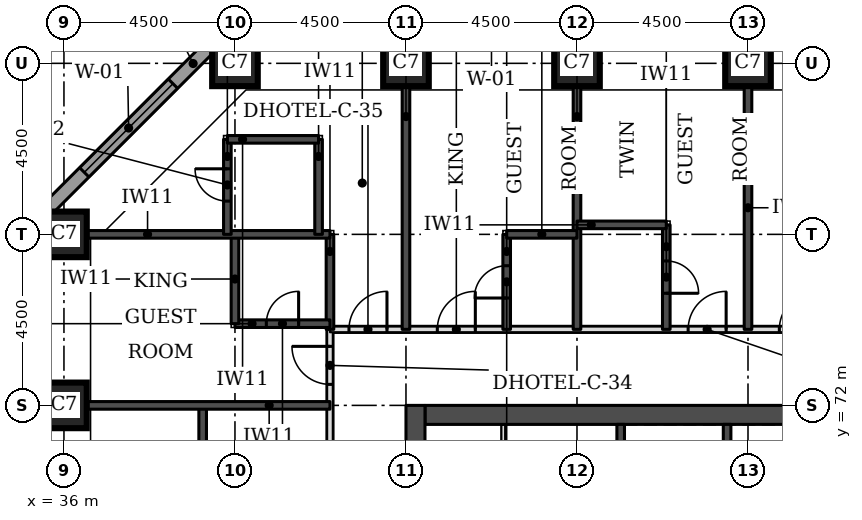
"""IFC4 building model, lengths in metres.
Left out: names, types, materials, properties, quantities, classifications, styles, units other than length and angle.
Written with IfcOpenShell. Run it as: python <this file> out.ifc"""

import sys

from ifc_helpers import new_model, si_unit, direction, frame, frame_2d, origin, origin_2d, place, context, subcontext, project, spatial, rectangle, extrude, element, fill, save


model = new_model("IFC4")
c1 = context("Model", 3, precision=1e-05, world=origin(), true_north=direction((0.0, 1.0)))
c2 = subcontext(c1, "Body", "Model", "MODEL_VIEW")
j1 = project(units=[si_unit("LENGTHUNIT", "METRE"), si_unit("PLANEANGLEUNIT", "RADIAN")], contexts=[c1])
p1 = place(None, origin())
s1 = spatial("IfcSite", under=j1, at=p1, CompositionType="ELEMENT")
p2 = place(p1, origin())
s2 = spatial("IfcBuilding", under=s1, at=p2, CompositionType="ELEMENT")
p3 = place(p2, frame((0.0, 0.0, 33.0)))
s3 = spatial("IfcBuildingStorey", under=s2, at=p3, CompositionType="ELEMENT", Elevation=33.0)
for number, where, z_axis, x_axis in (
    (1, (36.0, 72.0, 0.0), (0.0, 0.0, 1.0), (1.0, 0.0, 0.0)),
    (2, (36.0, 76.5, 0.0), (0.0, 0.0, 1.0), (1.0, 0.0, 0.0)),
    (3, (40.5, 81.0, 0.0), (0.0, 0.0, 1.0), (1.0, 0.0, 0.0)),
    (4, (45.0, 81.0, 0.0), (0.0, 0.0, 1.0), (1.0, 0.0, 0.0)),
    (5, (49.5, 81.0, 0.0), (0.0, 0.0, 1.0), (1.0, 0.0, 0.0)),
    (6, (54.0, 81.0, 0.0), (0.0, 0.0, 1.0), (1.0, 0.0, 0.0)),
):
    element("IfcColumn", number, at=place(p3, frame(where, z_axis=z_axis, x_axis=x_axis)), inside=s3, PredefinedType="COLUMN", context=c2, shape_type="SweptSolid", body=[
        extrude(rectangle(XDim=1.2, YDim=1.2, at=origin_2d()), origin(), (0.0, 0.0, 1.0), 3.3),
    ])
p4 = place(p3, frame((45.5, 71.75, 0.0), z_axis=(0.0, 0.0, 1.0), x_axis=(1.0, 0.0, 0.0)))
e7 = element("IfcWall", 7, at=p4, inside=s3, PredefinedType="SHEAR", context=c2, shape_type="SweptSolid", body=[
    extrude(rectangle(XDim=21.5, YDim=0.5, at=frame_2d((10.75, 0.0))), origin(), (0.0, 0.0, 1.0), 3.3),
])
p5 = place(p3, frame((45.25, 49.5, 0.0), z_axis=(0.0, 0.0, 1.0), x_axis=(0.0, 1.0, 0.0)))
e8 = element("IfcWall", 8, at=p5, inside=s3, PredefinedType="SHEAR", context=c2, shape_type="SweptSolid", body=[
    extrude(rectangle(XDim=22.5, YDim=0.5, at=frame_2d((11.25, 0.0))), origin(), (0.0, 0.0, 1.0), 3.3),
])
p6 = place(p5, frame((4.2, 0.0, 0.0)))
e9 = element("IfcOpeningElement", 9, at=p6, cuts=e8, PredefinedType="OPENING", context=c2, shape_type="SweptSolid", body=[
    extrude(rectangle(XDim=1.8, YDim=2.1, at=frame_2d((0.9, 1.05))), frame((0.0, 0.26, 0.0), z_axis=(0.0, -1.0, 0.0), x_axis=(1.0, 0.0, 0.0)), (0.0, 0.0, 1.0), 0.52),
])
p7 = place(p5, frame((6.9, 0.0, 0.0)))
e10 = element("IfcOpeningElement", 10, at=p7, cuts=e8, PredefinedType="OPENING", context=c2, shape_type="SweptSolid", body=[
    extrude(rectangle(XDim=1.1, YDim=2.1, at=frame_2d((0.55, 1.05))), frame((0.0, 0.26, 0.0), z_axis=(0.0, -1.0, 0.0), x_axis=(1.0, 0.0, 0.0)), (0.0, 0.0, 1.0), 0.52),
])
p8 = place(p5, frame((13.6, 0.0, 0.0)))
e11 = element("IfcOpeningElement", 11, at=p8, cuts=e8, PredefinedType="OPENING", context=c2, shape_type="SweptSolid", body=[
    extrude(rectangle(XDim=1.1, YDim=2.1, at=frame_2d((0.55, 1.05))), frame((0.0, 0.26, 0.0), z_axis=(0.0, -1.0, 0.0), x_axis=(1.0, 0.0, 0.0)), (0.0, 0.0, 1.0), 0.52),
])
p9 = place(p5, frame((16.5, 0.0, 0.0)))
e12 = element("IfcOpeningElement", 12, at=p9, cuts=e8, PredefinedType="OPENING", context=c2, shape_type="SweptSolid", body=[
    extrude(rectangle(XDim=1.8, YDim=2.1, at=frame_2d((0.9, 1.05))), frame((0.0, 0.26, 0.0), z_axis=(0.0, -1.0, 0.0), x_axis=(1.0, 0.0, 0.0)), (0.0, 0.0, 1.0), 0.52),
])
p10 = place(p3, frame((40.23, 81.826, 0.0), z_axis=(0.0, 0.0, 1.0), x_axis=(-0.707106781187, -0.707106781187, 0.0)))
e13 = element("IfcWall", 13, at=p10, inside=s3, PredefinedType="STANDARD", context=c2, shape_type="SweptSolid", body=[
    extrude(rectangle(XDim=7.151, YDim=0.35, at=frame_2d((3.576, 0.0))), origin(), (0.0, 0.0, 1.0), 3.055),
])
p11 = place(p10, frame((1.926, 0.0, 0.8)))
e14 = element("IfcOpeningElement", 14, at=p11, cuts=e13, PredefinedType="OPENING", context=c2, shape_type="SweptSolid", body=[
    extrude(rectangle(XDim=3.3, YDim=1.5, at=frame_2d((1.65, 0.75))), frame((0.0, 0.185, 0.0), z_axis=(0.0, -1.0, 0.0), x_axis=(1.0, 0.0, 0.0)), (0.0, 0.0, 1.0), 0.37),
])
p12 = place(p3, frame((43.0, 56.0, 0.0), z_axis=(0.0, 0.0, 1.0), x_axis=(0.0, 1.0, 0.0)))
e15 = element("IfcWall", 15, at=p12, inside=s3, PredefinedType="PARTITIONING", context=c2, shape_type="SweptSolid", body=[
    extrude(rectangle(XDim=18.0, YDim=0.15, at=frame_2d((9.0, 0.0))), origin(), (0.0, 0.0, 1.0), 3.08),
])
p13 = place(p12, frame((9.775, 0.0, 0.0)))
e16 = element("IfcOpeningElement", 16, at=p13, cuts=e15, PredefinedType="OPENING", context=c2, shape_type="SweptSolid", body=[
    extrude(rectangle(XDim=1.0, YDim=2.1, at=frame_2d((0.5, 1.05))), frame((0.0, 0.085, 0.0), z_axis=(0.0, -1.0, 0.0), x_axis=(1.0, 0.0, 0.0)), (0.0, 0.0, 1.0), 0.17),
])
p14 = place(p12, frame((16.553, 0.0, 0.0)))
e17 = element("IfcOpeningElement", 17, at=p14, cuts=e15, PredefinedType="OPENING", context=c2, shape_type="SweptSolid", body=[
    extrude(rectangle(XDim=1.0, YDim=2.1, at=frame_2d((0.5, 1.05))), frame((0.0, 0.085, 0.0), z_axis=(0.0, -1.0, 0.0), x_axis=(1.0, 0.0, 0.0)), (0.0, 0.0, 1.0), 0.17),
])
p15 = place(p12, frame((3.05, 0.0, 0.0)))
e18 = element("IfcOpeningElement", 18, at=p15, cuts=e15, PredefinedType="OPENING", context=c2, shape_type="SweptSolid", body=[
    extrude(rectangle(XDim=0.9, YDim=2.1, at=frame_2d((0.45, 1.05))), frame((0.0, 0.085, 0.0), z_axis=(0.0, -1.0, 0.0), x_axis=(1.0, 0.0, 0.0)), (0.0, 0.0, 1.0), 0.17),
])
p16 = place(p3, frame((43.0, 74.0, 0.0), z_axis=(0.0, 0.0, 1.0), x_axis=(1.0, 0.0, 0.0)))
e19 = element("IfcWall", 19, at=p16, inside=s3, PredefinedType="PARTITIONING", context=c2, shape_type="SweptSolid", body=[
    extrude(rectangle(XDim=26.5, YDim=0.15, at=frame_2d((13.25, 0.0))), origin(), (0.0, 0.0, 1.0), 3.08),
])
p17 = place(p16, frame((2.825, 0.0, 0.0)))
e20 = element("IfcOpeningElement", 20, at=p17, cuts=e19, PredefinedType="OPENING", context=c2, shape_type="SweptSolid", body=[
    extrude(rectangle(XDim=1.0, YDim=2.1, at=frame_2d((0.5, 1.05))), frame((0.0, 0.085, 0.0), z_axis=(0.0, -1.0, 0.0), x_axis=(1.0, 0.0, 0.0)), (0.0, 0.0, 1.0), 0.17),
])
p18 = place(p16, frame((9.425, 0.0, 0.0)))
e21 = element("IfcOpeningElement", 21, at=p18, cuts=e19, PredefinedType="OPENING", context=c2, shape_type="SweptSolid", body=[
    extrude(rectangle(XDim=1.0, YDim=2.1, at=frame_2d((0.5, 1.05))), frame((0.0, 0.085, 0.0), z_axis=(0.0, -1.0, 0.0), x_axis=(1.0, 0.0, 0.0)), (0.0, 0.0, 1.0), 0.17),
])
p19 = place(p16, frame((11.825, 0.0, 0.0)))
e22 = element("IfcOpeningElement", 22, at=p19, cuts=e19, PredefinedType="OPENING", context=c2, shape_type="SweptSolid", body=[
    extrude(rectangle(XDim=1.0, YDim=2.1, at=frame_2d((0.5, 1.05))), frame((0.0, 0.085, 0.0), z_axis=(0.0, -1.0, 0.0), x_axis=(1.0, 0.0, 0.0)), (0.0, 0.0, 1.0), 0.17),
])
p20 = place(p16, frame((18.425, 0.0, 0.0)))
e23 = element("IfcOpeningElement", 23, at=p20, cuts=e19, PredefinedType="OPENING", context=c2, shape_type="SweptSolid", body=[
    extrude(rectangle(XDim=1.0, YDim=2.1, at=frame_2d((0.5, 1.05))), frame((0.0, 0.085, 0.0), z_axis=(0.0, -1.0, 0.0), x_axis=(1.0, 0.0, 0.0)), (0.0, 0.0, 1.0), 0.17),
])
p21 = place(p16, frame((20.825, 0.0, 0.0)))
e24 = element("IfcOpeningElement", 24, at=p21, cuts=e19, PredefinedType="OPENING", context=c2, shape_type="SweptSolid", body=[
    extrude(rectangle(XDim=1.0, YDim=2.1, at=frame_2d((0.5, 1.05))), frame((0.0, 0.085, 0.0), z_axis=(0.0, -1.0, 0.0), x_axis=(1.0, 0.0, 0.0)), (0.0, 0.0, 1.0), 0.17),
])
p22 = place(p16, frame((0.5, 0.0, 0.0)))
e25 = element("IfcOpeningElement", 25, at=p22, cuts=e19, PredefinedType="OPENING", context=c2, shape_type="SweptSolid", body=[
    extrude(rectangle(XDim=1.0, YDim=2.1, at=frame_2d((0.5, 1.05))), frame((0.0, 0.085, 0.0), z_axis=(0.0, -1.0, 0.0), x_axis=(1.0, 0.0, 0.0)), (0.0, 0.0, 1.0), 0.17),
])
p23 = place(p16, frame((25.0, 0.0, 0.0)))
e26 = element("IfcOpeningElement", 26, at=p23, cuts=e19, PredefinedType="OPENING", context=c2, shape_type="SweptSolid", body=[
    extrude(rectangle(XDim=1.0, YDim=2.1, at=frame_2d((0.5, 1.05))), frame((0.0, 0.085, 0.0), z_axis=(0.0, -1.0, 0.0), x_axis=(1.0, 0.0, 0.0)), (0.0, 0.0, 1.0), 0.17),
])
p24 = place(p3, frame((39.65, 69.55, 0.0), z_axis=(0.0, 0.0, 1.0), x_axis=(0.0, 1.0, 0.0)))
e27 = element("IfcWall", 27, at=p24, inside=s3, PredefinedType="SOLIDWALL", context=c2, shape_type="SweptSolid", body=[
    extrude(rectangle(XDim=2.45, YDim=0.2, at=frame_2d((1.225, 0.0))), origin(), (0.0, 0.0, 1.0), 3.08),
])
p25 = place(p3, frame((36.6, 72.0, 0.0), z_axis=(0.0, 0.0, 1.0), x_axis=(1.0, 0.0, 0.0)))
e28 = element("IfcWall", 28, at=p25, inside=s3, PredefinedType="SOLIDWALL", context=c2, shape_type="SweptSolid", body=[
    extrude(rectangle(XDim=6.4, YDim=0.2, at=frame_2d((3.2, 0.0))), origin(), (0.0, 0.0, 1.0), 3.08),
])
p26 = place(p3, frame((43.0, 74.0, 0.0), z_axis=(0.0, 0.0, 1.0), x_axis=(0.0, 1.0, 0.0)))
e29 = element("IfcWall", 29, at=p26, inside=s3, PredefinedType="SOLIDWALL", context=c2, shape_type="SweptSolid", body=[
    extrude(rectangle(XDim=2.5, YDim=0.2, at=frame_2d((1.25, 0.0))), origin(), (0.0, 0.0, 1.0), 3.08),
])
p27 = place(p3, frame((45.0, 74.0, 0.0), z_axis=(0.0, 0.0, 1.0), x_axis=(0.0, 1.0, 0.0)))
e30 = element("IfcWall", 30, at=p27, inside=s3, PredefinedType="SOLIDWALL", context=c2, shape_type="SweptSolid", body=[
    extrude(rectangle(XDim=6.4, YDim=0.2, at=frame_2d((3.2, 0.0))), origin(), (0.0, 0.0, 1.0), 3.08),
])
p28 = place(p3, frame((47.65, 74.0, 0.0), z_axis=(0.0, 0.0, 1.0), x_axis=(0.0, 1.0, 0.0)))
e31 = element("IfcWall", 31, at=p28, inside=s3, PredefinedType="SOLIDWALL", context=c2, shape_type="SweptSolid", body=[
    extrude(rectangle(XDim=2.5, YDim=0.2, at=frame_2d((1.25, 0.0))), origin(), (0.0, 0.0, 1.0), 3.08),
])
p29 = place(p28, frame((0.825, 0.0, 0.0)))
e32 = element("IfcOpeningElement", 32, at=p29, cuts=e31, PredefinedType="OPENING", context=c2, shape_type="SweptSolid", body=[
    extrude(rectangle(XDim=0.85, YDim=2.1, at=frame_2d((0.425, 1.05))), frame((0.0, 0.11, 0.0), z_axis=(0.0, -1.0, 0.0), x_axis=(1.0, 0.0, 0.0)), (0.0, 0.0, 1.0), 0.22),
])
p30 = place(p3, frame((49.5, 74.0, 0.0), z_axis=(0.0, 0.0, 1.0), x_axis=(0.0, 1.0, 0.0)))
e33 = element("IfcWall", 33, at=p30, inside=s3, PredefinedType="SOLIDWALL", context=c2, shape_type="SweptSolid", body=[
    extrude(rectangle(XDim=6.4, YDim=0.2, at=frame_2d((3.2, 0.0))), origin(), (0.0, 0.0, 1.0), 3.08),
])
p31 = place(p3, frame((51.85, 74.0, 0.0), z_axis=(0.0, 0.0, 1.0), x_axis=(0.0, 1.0, 0.0)))
e34 = element("IfcWall", 34, at=p31, inside=s3, PredefinedType="SOLIDWALL", context=c2, shape_type="SweptSolid", body=[
    extrude(rectangle(XDim=2.75, YDim=0.2, at=frame_2d((1.375, 0.0))), origin(), (0.0, 0.0, 1.0), 3.08),
])
p32 = place(p31, frame((0.95, 0.0, 0.0)))
e35 = element("IfcOpeningElement", 35, at=p32, cuts=e34, PredefinedType="OPENING", context=c2, shape_type="SweptSolid", body=[
    extrude(rectangle(XDim=0.85, YDim=2.1, at=frame_2d((0.425, 1.05))), frame((0.0, 0.11, 0.0), z_axis=(0.0, -1.0, 0.0), x_axis=(1.0, 0.0, 0.0)), (0.0, 0.0, 1.0), 0.22),
])
p33 = place(p3, frame((54.0, 74.0, 0.0), z_axis=(0.0, 0.0, 1.0), x_axis=(0.0, 1.0, 0.0)))
e36 = element("IfcWall", 36, at=p33, inside=s3, PredefinedType="SOLIDWALL", context=c2, shape_type="SweptSolid", body=[
    extrude(rectangle(XDim=6.4, YDim=0.2, at=frame_2d((3.2, 0.0))), origin(), (0.0, 0.0, 1.0), 3.08),
])
p34 = place(p3, frame((40.5, 74.15, 0.0), z_axis=(0.0, 0.0, 1.0), x_axis=(1.0, 0.0, 0.0)))
e37 = element("IfcWall", 37, at=p34, inside=s3, PredefinedType="SOLIDWALL", context=c2, shape_type="SweptSolid", body=[
    extrude(rectangle(XDim=2.5, YDim=0.2, at=frame_2d((1.25, 0.0))), origin(), (0.0, 0.0, 1.0), 3.08),
])
p35 = place(p34, frame((0.825, 0.0, 0.0)))
e38 = element("IfcOpeningElement", 38, at=p35, cuts=e37, PredefinedType="OPENING", context=c2, shape_type="SweptSolid", body=[
    extrude(rectangle(XDim=0.85, YDim=2.1, at=frame_2d((0.425, 1.05))), frame((0.0, 0.11, 0.0), z_axis=(0.0, -1.0, 0.0), x_axis=(1.0, 0.0, 0.0)), (0.0, 0.0, 1.0), 0.22),
])
p36 = place(p3, frame((40.5, 74.15, 0.0), z_axis=(0.0, 0.0, 1.0), x_axis=(0.0, 1.0, 0.0)))
e39 = element("IfcWall", 39, at=p36, inside=s3, PredefinedType="SOLIDWALL", context=c2, shape_type="SweptSolid", body=[
    extrude(rectangle(XDim=2.35, YDim=0.2, at=frame_2d((1.175, 0.0))), origin(), (0.0, 0.0, 1.0), 3.08),
])
p37 = place(p3, frame((36.6, 76.5, 0.0), z_axis=(0.0, 0.0, 1.0), x_axis=(1.0, 0.0, 0.0)))
e40 = element("IfcWall", 40, at=p37, inside=s3, PredefinedType="SOLIDWALL", context=c2, shape_type="SweptSolid", body=[
    extrude(rectangle(XDim=6.4, YDim=0.2, at=frame_2d((3.2, 0.0))), origin(), (0.0, 0.0, 1.0), 3.08),
])
p38 = place(p3, frame((40.3, 76.5, 0.0), z_axis=(0.0, 0.0, 1.0), x_axis=(0.0, 1.0, 0.0)))
e41 = element("IfcWall", 41, at=p38, inside=s3, PredefinedType="SOLIDWALL", context=c2, shape_type="SweptSolid", body=[
    extrude(rectangle(XDim=2.5, YDim=0.2, at=frame_2d((1.25, 0.0))), origin(), (0.0, 0.0, 1.0), 3.08),
])
p39 = place(p38, frame((0.875, 0.0, 0.0)))
e42 = element("IfcOpeningElement", 42, at=p39, cuts=e41, PredefinedType="OPENING", context=c2, shape_type="SweptSolid", body=[
    extrude(rectangle(XDim=0.85, YDim=2.1, at=frame_2d((0.425, 1.05))), frame((0.0, 0.11, 0.0), z_axis=(0.0, -1.0, 0.0), x_axis=(1.0, 0.0, 0.0)), (0.0, 0.0, 1.0), 0.22),
])
p40 = place(p3, frame((42.7, 76.5, 0.0), z_axis=(0.0, 0.0, 1.0), x_axis=(0.0, 1.0, 0.0)))
e43 = element("IfcWall", 43, at=p40, inside=s3, PredefinedType="SOLIDWALL", context=c2, shape_type="SweptSolid", body=[
    extrude(rectangle(XDim=2.5, YDim=0.2, at=frame_2d((1.25, 0.0))), origin(), (0.0, 0.0, 1.0), 3.08),
])
p41 = place(p3, frame((47.65, 76.5, 0.0), z_axis=(0.0, 0.0, 1.0), x_axis=(1.0, 0.0, 0.0)))
e44 = element("IfcWall", 44, at=p41, inside=s3, PredefinedType="SOLIDWALL", context=c2, shape_type="SweptSolid", body=[
    extrude(rectangle(XDim=1.85, YDim=0.2, at=frame_2d((0.925, 0.0))), origin(), (0.0, 0.0, 1.0), 3.08),
])
p42 = place(p3, frame((49.5, 76.75, 0.0), z_axis=(0.0, 0.0, 1.0), x_axis=(1.0, 0.0, 0.0)))
e45 = element("IfcWall", 45, at=p42, inside=s3, PredefinedType="SOLIDWALL", context=c2, shape_type="SweptSolid", body=[
    extrude(rectangle(XDim=2.35, YDim=0.2, at=frame_2d((1.175, 0.0))), origin(), (0.0, 0.0, 1.0), 3.08),
])
p43 = place(p3, frame((40.3, 79.0, 0.0), z_axis=(0.0, 0.0, 1.0), x_axis=(1.0, 0.0, 0.0)))
e46 = element("IfcWall", 46, at=p43, inside=s3, PredefinedType="SOLIDWALL", context=c2, shape_type="SweptSolid", body=[
    extrude(rectangle(XDim=2.4, YDim=0.2, at=frame_2d((1.2, 0.0))), origin(), (0.0, 0.0, 1.0), 3.08),
])
p44 = place(p3, frame((47.56, 68.5, 0.0), z_axis=(0.0, 0.0, 1.0), x_axis=(0.0, 1.0, 0.0)))
e47 = element("IfcWall", 47, at=p44, inside=s3, PredefinedType="PARTITIONING", context=c2, shape_type="SweptSolid", body=[
    extrude(rectangle(XDim=3.0, YDim=0.1, at=frame_2d((1.5, 0.0))), origin(), (0.0, 0.0, 1.0), 3.08),
])
for number, where, z_axis, x_axis in (
    (48, (50.65, 68.5, 0.0), (0.0, 0.0, 1.0), (0.0, 1.0, 0.0)),
    (49, (53.45, 68.5, 0.0), (0.0, 0.0, 1.0), (0.0, 1.0, 0.0)),
):
    element("IfcWall", number, at=place(p3, frame(where, z_axis=z_axis, x_axis=x_axis)), inside=s3, PredefinedType="SOLIDWALL", context=c2, shape_type="SweptSolid", body=[
        extrude(rectangle(XDim=3.0, YDim=0.2, at=frame_2d((1.5, 0.0))), origin(), (0.0, 0.0, 1.0), 3.08),
    ])
p45 = place(p11, origin())
e50 = element("IfcWindow", 50, at=p45, inside=s3, PartitioningType="SINGLE_PANEL", PredefinedType="WINDOW", context=c2, shape_type="SweptSolid", body=[
    extrude(rectangle(XDim=3.3, YDim=1.5, at=frame_2d((1.65, 0.75))), frame((0.0, 0.085, 0.0), z_axis=(0.0, -1.0, 0.0), x_axis=(1.0, 0.0, 0.0)), (0.0, 0.0, 1.0), 0.06),
])
fill(e14, e50)
p46 = place(p14, origin())
e51 = element("IfcDoor", 51, at=p46, inside=s3, OperationType="SINGLE_SWING_RIGHT", PredefinedType="DOOR", context=c2, shape_type="SweptSolid", body=[
    extrude(rectangle(XDim=1.0, YDim=2.1, at=frame_2d((0.5, 1.05))), frame((0.0, 0.025, 0.0), z_axis=(0.0, -1.0, 0.0), x_axis=(1.0, 0.0, 0.0)), (0.0, 0.0, 1.0), 0.05),
])
fill(e17, e51)
p47 = place(p35, origin())
e52 = element("IfcDoor", 52, at=p47, inside=s3, OperationType="SINGLE_SWING_RIGHT", PredefinedType="DOOR", context=c2, shape_type="SweptSolid", body=[
    extrude(rectangle(XDim=0.85, YDim=2.1, at=frame_2d((0.425, 1.05))), frame((0.0, 0.025, 0.0), z_axis=(0.0, -1.0, 0.0), x_axis=(1.0, 0.0, 0.0)), (0.0, 0.0, 1.0), 0.05),
])
fill(e38, e52)
p48 = place(p17, origin())
e53 = element("IfcDoor", 53, at=p48, inside=s3, OperationType="SINGLE_SWING_RIGHT", PredefinedType="DOOR", context=c2, shape_type="SweptSolid", body=[
    extrude(rectangle(XDim=1.0, YDim=2.1, at=frame_2d((0.5, 1.05))), frame((0.0, 0.025, 0.0), z_axis=(0.0, -1.0, 0.0), x_axis=(1.0, 0.0, 0.0)), (0.0, 0.0, 1.0), 0.05),
])
fill(e20, e53)
p49 = place(p29, origin())
e54 = element("IfcDoor", 54, at=p49, inside=s3, OperationType="SINGLE_SWING_LEFT", PredefinedType="DOOR", context=c2, shape_type="SweptSolid", body=[
    extrude(rectangle(XDim=0.85, YDim=2.1, at=frame_2d((0.425, 1.05))), frame((0.0, 0.025, 0.0), z_axis=(0.0, -1.0, 0.0), x_axis=(1.0, 0.0, 0.0)), (0.0, 0.0, 1.0), 0.05),
])
fill(e32, e54)
p50 = place(p18, origin())
e55 = element("IfcDoor", 55, at=p50, inside=s3, OperationType="SINGLE_SWING_RIGHT", PredefinedType="DOOR", context=c2, shape_type="SweptSolid", body=[
    extrude(rectangle(XDim=1.0, YDim=2.1, at=frame_2d((0.5, 1.05))), frame((0.0, 0.025, 0.0), z_axis=(0.0, -1.0, 0.0), x_axis=(1.0, 0.0, 0.0)), (0.0, 0.0, 1.0), 0.05),
])
fill(e21, e55)
p51 = place(p32, frame((0.85, 0.0, 0.0), z_axis=(0.0, 0.0, 1.0), x_axis=(-1.0, 0.0, 0.0)))
e56 = element("IfcDoor", 56, at=p51, inside=s3, OperationType="SINGLE_SWING_RIGHT", PredefinedType="DOOR", context=c2, shape_type="SweptSolid", body=[
    extrude(rectangle(XDim=0.85, YDim=2.1, at=frame_2d((0.425, 1.05))), frame((0.0, 0.025, 0.0), z_axis=(0.0, -1.0, 0.0), x_axis=(1.0, 0.0, 0.0)), (0.0, 0.0, 1.0), 0.05),
])
fill(e35, e56)
p52 = place(p19, origin())
e57 = element("IfcDoor", 57, at=p52, inside=s3, OperationType="SINGLE_SWING_RIGHT", PredefinedType="DOOR", context=c2, shape_type="SweptSolid", body=[
    extrude(rectangle(XDim=1.0, YDim=2.1, at=frame_2d((0.5, 1.05))), frame((0.0, 0.025, 0.0), z_axis=(0.0, -1.0, 0.0), x_axis=(1.0, 0.0, 0.0)), (0.0, 0.0, 1.0), 0.05),
])
fill(e22, e57)
p53 = place(p22, origin())
e58 = element("IfcDoor", 58, at=p53, inside=s3, OperationType="SINGLE_SWING_RIGHT", PredefinedType="DOOR", context=c2, shape_type="SweptSolid", body=[
    extrude(rectangle(XDim=1.0, YDim=2.1, at=frame_2d((0.5, 1.05))), frame((0.0, 0.025, 0.0), z_axis=(0.0, -1.0, 0.0), x_axis=(1.0, 0.0, 0.0)), (0.0, 0.0, 1.0), 0.05),
])
fill(e25, e58)
p54 = place(p39, origin())
e59 = element("IfcDoor", 59, at=p54, inside=s3, OperationType="SINGLE_SWING_RIGHT", PredefinedType="DOOR", context=c2, shape_type="SweptSolid", body=[
    extrude(rectangle(XDim=0.85, YDim=2.1, at=frame_2d((0.425, 1.05))), frame((0.0, 0.025, 0.0), z_axis=(0.0, -1.0, 0.0), x_axis=(1.0, 0.0, 0.0)), (0.0, 0.0, 1.0), 0.05),
])
fill(e42, e59)
save(model, sys.argv[1])
